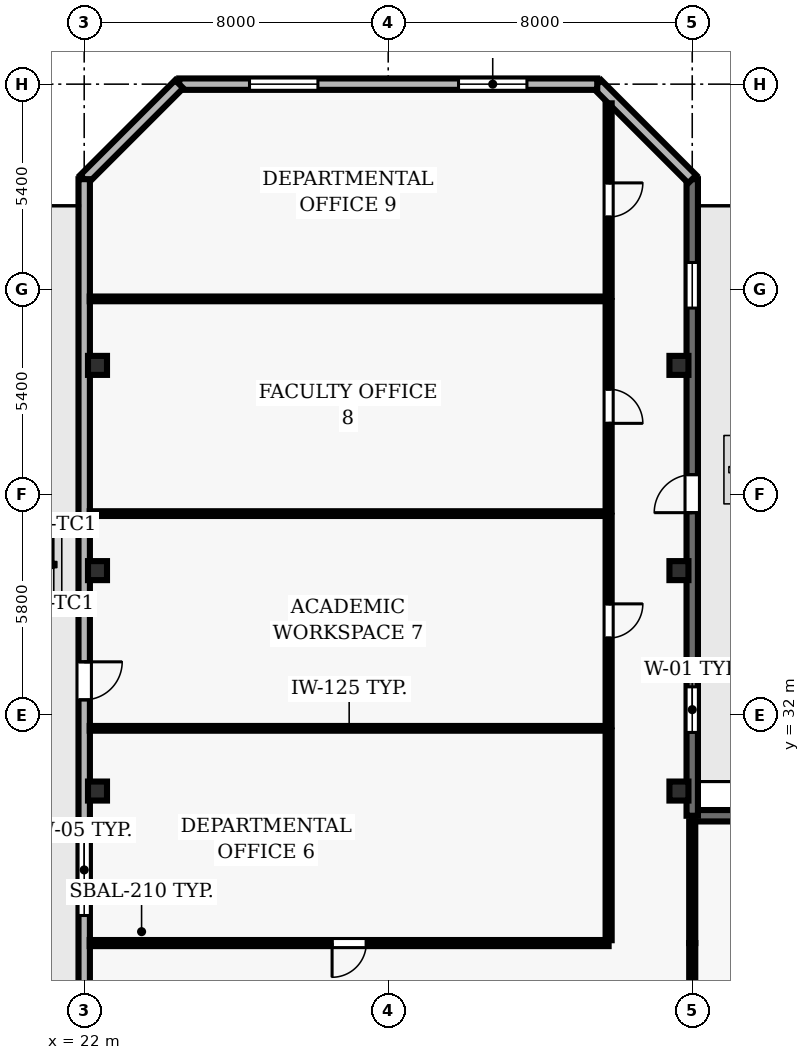
"""IFC4 building model, lengths in metres.
Left out: names, types, materials, properties, quantities, classifications, styles, units other than length and angle.
Written with IfcOpenShell. Run it as: python <this file> out.ifc"""

import sys

from ifc_helpers import new_model, si_unit, direction, frame, frame_2d, origin, origin_2d, place, context, subcontext, project, spatial, rectangle, hollow_rectangle, extrude, element, fill, save


model = new_model("IFC4")
c1 = context("Model", 3, precision=1e-05, world=origin(), true_north=direction((0.0, 1.0)))
c2 = subcontext(c1, "Body", "Model", "MODEL_VIEW")
j1 = project(units=[si_unit("LENGTHUNIT", "METRE"), si_unit("PLANEANGLEUNIT", "RADIAN")], contexts=[c1])
p1 = place(None, origin())
s1 = spatial("IfcSite", under=j1, at=p1, CompositionType="ELEMENT")
p2 = place(p1, origin())
s2 = spatial("IfcBuilding", under=s1, at=p2, CompositionType="ELEMENT")
p3 = place(p2, frame((0.0, 0.0, 119.0)))
s3 = spatial("IfcBuildingStorey", under=s2, at=p3, CompositionType="ELEMENT", Elevation=119.0)
for number, where, z_axis, x_axis in (
    (1, (22.35, 30.0, 0.0), (0.0, 0.0, 1.0), (1.0, 0.0, 0.0)),
    (2, (37.65, 30.0, 0.0), (0.0, 0.0, 1.0), (1.0, 0.0, 0.0)),
    (3, (22.35, 35.8, 0.0), (0.0, 0.0, 1.0), (1.0, 0.0, 0.0)),
    (4, (37.65, 35.8, 0.0), (0.0, 0.0, 1.0), (1.0, 0.0, 0.0)),
    (5, (22.35, 41.2, 0.0), (0.0, 0.0, 1.0), (1.0, 0.0, 0.0)),
    (6, (37.65, 41.2, 0.0), (0.0, 0.0, 1.0), (1.0, 0.0, 0.0)),
):
    element("IfcColumn", number, at=place(p3, frame(where, z_axis=z_axis, x_axis=x_axis)), inside=s3, PredefinedType="COLUMN", context=c2, shape_type="SweptSolid", body=[
        extrude(hollow_rectangle(XDim=0.5, YDim=0.5, WallThickness=0.025, at=origin_2d()), origin(), (0.0, 0.0, 1.0), 3.9),
    ])
p4 = place(p3, frame((46.804, 29.35, 0.0), z_axis=(0.0, 0.0, 1.0), x_axis=(-1.0, 0.0, 0.0)))
e7 = element("IfcWall", 7, at=p4, inside=s3, PredefinedType="SOLIDWALL", context=c2, shape_type="SweptSolid", body=[
    extrude(rectangle(XDim=8.804, YDim=0.3, at=frame_2d((4.402, 0.0))), origin(), (0.0, 0.0, 1.0), 3.69),
])
p5 = place(p4, frame((2.902, 0.0, 0.9)))
e8 = element("IfcOpeningElement", 8, at=p5, cuts=e7, PredefinedType="OPENING", context=c2, shape_type="SweptSolid", body=[
    extrude(rectangle(XDim=3.0, YDim=2.2, at=frame_2d((1.5, 1.1))), frame((0.0, 0.16, 0.0), z_axis=(0.0, -1.0, 0.0), x_axis=(1.0, 0.0, 0.0)), (0.0, 0.0, 1.0), 0.32),
])
p6 = place(p3, frame((38.0, 29.35, 0.0), z_axis=(0.0, 0.0, 1.0), x_axis=(0.0, 1.0, 0.0)))
e9 = element("IfcWall", 9, at=p6, inside=s3, PredefinedType="SOLIDWALL", context=c2, shape_type="SweptSolid", body=[
    extrude(rectangle(XDim=16.75, YDim=0.3, at=frame_2d((8.375, 0.0))), origin(), (0.0, 0.0, 1.0), 3.69),
])
p7 = place(p6, frame((7.975, 0.0, 0.0)))
e10 = element("IfcOpeningElement", 10, at=p7, cuts=e9, PredefinedType="OPENING", context=c2, shape_type="SweptSolid", body=[
    extrude(rectangle(XDim=1.0, YDim=2.2, at=frame_2d((0.5, 1.1))), frame((0.0, 0.16, 0.0), z_axis=(0.0, -1.0, 0.0), x_axis=(1.0, 0.0, 0.0)), (0.0, 0.0, 1.0), 0.32),
])
p8 = place(p6, frame((2.192, 0.0, 0.9)))
e11 = element("IfcOpeningElement", 11, at=p8, cuts=e9, PredefinedType="OPENING", context=c2, shape_type="SweptSolid", body=[
    extrude(rectangle(XDim=1.2, YDim=1.6, at=frame_2d((0.6, 0.8))), frame((0.0, 0.16, 0.0), z_axis=(0.0, -1.0, 0.0), x_axis=(1.0, 0.0, 0.0)), (0.0, 0.0, 1.0), 0.32),
])
p9 = place(p6, frame((13.358, 0.0, 0.9)))
e12 = element("IfcOpeningElement", 12, at=p9, cuts=e9, PredefinedType="OPENING", context=c2, shape_type="SweptSolid", body=[
    extrude(rectangle(XDim=1.2, YDim=1.6, at=frame_2d((0.6, 0.8))), frame((0.0, 0.16, 0.0), z_axis=(0.0, -1.0, 0.0), x_axis=(1.0, 0.0, 0.0)), (0.0, 0.0, 1.0), 0.32),
])
p10 = place(p3, frame((38.0, 46.1, 0.0), z_axis=(0.0, 0.0, 1.0), x_axis=(-0.707106781187, 0.707106781187, 0.0)))
e13 = element("IfcWall", 13, at=p10, inside=s3, PredefinedType="SOLIDWALL", context=c2, shape_type="SweptSolid", body=[
    extrude(rectangle(XDim=3.536, YDim=0.3, at=frame_2d((1.768, 0.0))), origin(), (0.0, 0.0, 1.0), 3.69),
])
p11 = place(p3, frame((35.5, 48.6, 0.0), z_axis=(0.0, 0.0, 1.0), x_axis=(-1.0, 0.0, 0.0)))
e14 = element("IfcWall", 14, at=p11, inside=s3, PredefinedType="SOLIDWALL", context=c2, shape_type="SweptSolid", body=[
    extrude(rectangle(XDim=11.0, YDim=0.3, at=frame_2d((5.5, 0.0))), origin(), (0.0, 0.0, 1.0), 3.69),
])
p12 = place(p11, frame((1.85, 0.0, 0.9)))
e15 = element("IfcOpeningElement", 15, at=p12, cuts=e14, PredefinedType="OPENING", context=c2, shape_type="SweptSolid", body=[
    extrude(rectangle(XDim=1.8, YDim=1.6, at=frame_2d((0.9, 0.8))), frame((0.0, 0.16, 0.0), z_axis=(0.0, -1.0, 0.0), x_axis=(1.0, 0.0, 0.0)), (0.0, 0.0, 1.0), 0.32),
])
p13 = place(p11, frame((7.35, 0.0, 0.9)))
e16 = element("IfcOpeningElement", 16, at=p13, cuts=e14, PredefinedType="OPENING", context=c2, shape_type="SweptSolid", body=[
    extrude(rectangle(XDim=1.8, YDim=1.6, at=frame_2d((0.9, 0.8))), frame((0.0, 0.16, 0.0), z_axis=(0.0, -1.0, 0.0), x_axis=(1.0, 0.0, 0.0)), (0.0, 0.0, 1.0), 0.32),
])
p14 = place(p3, frame((24.5, 48.6, 0.0), z_axis=(0.0, 0.0, 1.0), x_axis=(-0.707106781187, -0.707106781187, 0.0)))
e17 = element("IfcWall", 17, at=p14, inside=s3, PredefinedType="SOLIDWALL", context=c2, shape_type="SweptSolid", body=[
    extrude(rectangle(XDim=3.536, YDim=0.3, at=frame_2d((1.768, 0.0))), origin(), (0.0, 0.0, 1.0), 3.69),
])
p15 = place(p3, frame((22.0, 46.1, 0.0), z_axis=(0.0, 0.0, 1.0), x_axis=(0.0, -1.0, 0.0)))
e18 = element("IfcWall", 18, at=p15, inside=s3, PredefinedType="SOLIDWALL", context=c2, shape_type="SweptSolid", body=[
    extrude(rectangle(XDim=43.6, YDim=0.3, at=frame_2d((21.8, 0.0))), origin(), (0.0, 0.0, 1.0), 3.69),
])
p16 = place(p15, frame((12.7, 0.0, 0.0)))
e19 = element("IfcOpeningElement", 19, at=p16, cuts=e18, PredefinedType="OPENING", context=c2, shape_type="SweptSolid", body=[
    extrude(rectangle(XDim=1.0, YDim=2.2, at=frame_2d((0.5, 1.1))), frame((0.0, 0.16, 0.0), z_axis=(0.0, -1.0, 0.0), x_axis=(1.0, 0.0, 0.0)), (0.0, 0.0, 1.0), 0.32),
])
p17 = place(p15, frame((16.975, 0.0, 0.9)))
e20 = element("IfcOpeningElement", 20, at=p17, cuts=e18, PredefinedType="OPENING", context=c2, shape_type="SweptSolid", body=[
    extrude(rectangle(XDim=2.4, YDim=1.6, at=frame_2d((1.2, 0.8))), frame((0.0, 0.16, 0.0), z_axis=(0.0, -1.0, 0.0), x_axis=(1.0, 0.0, 0.0)), (0.0, 0.0, 1.0), 0.32),
])
p18 = place(p15, frame((23.775, 0.0, 0.9)))
e21 = element("IfcOpeningElement", 21, at=p18, cuts=e18, PredefinedType="OPENING", context=c2, shape_type="SweptSolid", body=[
    extrude(rectangle(XDim=2.4, YDim=1.6, at=frame_2d((1.2, 0.8))), frame((0.0, 0.16, 0.0), z_axis=(0.0, -1.0, 0.0), x_axis=(1.0, 0.0, 0.0)), (0.0, 0.0, 1.0), 0.32),
])
p19 = place(p15, frame((27.875, 0.0, 0.9)))
e22 = element("IfcOpeningElement", 22, at=p19, cuts=e18, PredefinedType="OPENING", context=c2, shape_type="SweptSolid", body=[
    extrude(rectangle(XDim=2.4, YDim=1.6, at=frame_2d((1.2, 0.8))), frame((0.0, 0.16, 0.0), z_axis=(0.0, -1.0, 0.0), x_axis=(1.0, 0.0, 0.0)), (0.0, 0.0, 1.0), 0.32),
])
p20 = place(p15, frame((34.225, 0.0, 0.9)))
e23 = element("IfcOpeningElement", 23, at=p20, cuts=e18, PredefinedType="OPENING", context=c2, shape_type="SweptSolid", body=[
    extrude(rectangle(XDim=2.4, YDim=1.6, at=frame_2d((1.2, 0.8))), frame((0.0, 0.16, 0.0), z_axis=(0.0, -1.0, 0.0), x_axis=(1.0, 0.0, 0.0)), (0.0, 0.0, 1.0), 0.32),
])
p21 = place(p3, frame((35.8, 26.0, 0.0), z_axis=(0.0, 0.0, 1.0), x_axis=(-1.0, 0.0, 0.0)))
e24 = element("IfcWall", 24, at=p21, inside=s3, PredefinedType="PARTITIONING", context=c2, shape_type="SweptSolid", body=[
    extrude(rectangle(XDim=13.655, YDim=0.16, at=frame_2d((6.828, 0.0))), origin(), (0.0, 0.0, 1.0), 3.69),
])
p22 = place(p21, frame((6.377, 0.0, 0.0)))
e25 = element("IfcOpeningElement", 25, at=p22, cuts=e24, PredefinedType="OPENING", context=c2, shape_type="SweptSolid", body=[
    extrude(rectangle(XDim=0.9, YDim=2.1, at=frame_2d((0.45, 1.05))), frame((0.0, 0.09, 0.0), z_axis=(0.0, -1.0, 0.0), x_axis=(1.0, 0.0, 0.0)), (0.0, 0.0, 1.0), 0.18),
])
for number, where, z_axis, x_axis in (
    (26, (35.8, 31.65, 0.0), (0.0, 0.0, 1.0), (-1.0, 0.0, 0.0)),
    (27, (35.8, 37.3, 0.0), (0.0, 0.0, 1.0), (-1.0, 0.0, 0.0)),
    (28, (35.8, 42.95, 0.0), (0.0, 0.0, 1.0), (-1.0, 0.0, 0.0)),
):
    element("IfcWall", number, at=place(p3, frame(where, z_axis=z_axis, x_axis=x_axis)), inside=s3, PredefinedType="PARTITIONING", context=c2, shape_type="SweptSolid", body=[
        extrude(rectangle(XDim=13.655, YDim=0.125, at=frame_2d((6.828, 0.0))), origin(), (0.0, 0.0, 1.0), 3.69),
    ])
p23 = place(p3, frame((35.8, 31.592, 0.0), z_axis=(0.0, 0.0, 1.0), x_axis=(0.0, -1.0, 0.0)))
e29 = element("IfcWall", 29, at=p23, inside=s3, PredefinedType="PARTITIONING", context=c2, shape_type="SweptSolid", body=[
    extrude(rectangle(XDim=5.517, YDim=0.16, at=frame_2d((2.759, 0.0))), origin(), (0.0, 0.0, 1.0), 3.69),
])
p24 = place(p3, frame((35.8, 37.242, 0.0), z_axis=(0.0, 0.0, 1.0), x_axis=(0.0, -1.0, 0.0)))
e30 = element("IfcWall", 30, at=p24, inside=s3, PredefinedType="PARTITIONING", context=c2, shape_type="SweptSolid", body=[
    extrude(rectangle(XDim=5.535, YDim=0.16, at=frame_2d((2.768, 0.0))), origin(), (0.0, 0.0, 1.0), 3.69),
])
p25 = place(p24, frame((2.317, 0.0, 0.0)))
e31 = element("IfcOpeningElement", 31, at=p25, cuts=e30, PredefinedType="OPENING", context=c2, shape_type="SweptSolid", body=[
    extrude(rectangle(XDim=0.9, YDim=2.1, at=frame_2d((0.45, 1.05))), frame((0.0, 0.09, 0.0), z_axis=(0.0, -1.0, 0.0), x_axis=(1.0, 0.0, 0.0)), (0.0, 0.0, 1.0), 0.18),
])
p26 = place(p3, frame((35.8, 42.893, 0.0), z_axis=(0.0, 0.0, 1.0), x_axis=(0.0, -1.0, 0.0)))
e32 = element("IfcWall", 32, at=p26, inside=s3, PredefinedType="PARTITIONING", context=c2, shape_type="SweptSolid", body=[
    extrude(rectangle(XDim=5.536, YDim=0.16, at=frame_2d((2.768, 0.0))), origin(), (0.0, 0.0, 1.0), 3.69),
])
p27 = place(p26, frame((2.318, 0.0, 0.0)))
e33 = element("IfcOpeningElement", 33, at=p27, cuts=e32, PredefinedType="OPENING", context=c2, shape_type="SweptSolid", body=[
    extrude(rectangle(XDim=0.9, YDim=2.1, at=frame_2d((0.45, 1.05))), frame((0.0, 0.09, 0.0), z_axis=(0.0, -1.0, 0.0), x_axis=(1.0, 0.0, 0.0)), (0.0, 0.0, 1.0), 0.18),
])
p28 = place(p3, frame((35.8, 48.095, 0.0), z_axis=(0.0, 0.0, 1.0), x_axis=(0.0, -1.0, 0.0)))
e34 = element("IfcWall", 34, at=p28, inside=s3, PredefinedType="PARTITIONING", context=c2, shape_type="SweptSolid", body=[
    extrude(rectangle(XDim=5.087, YDim=0.16, at=frame_2d((2.543, 0.0))), origin(), (0.0, 0.0, 1.0), 3.69),
])
p29 = place(p28, frame((2.093, 0.0, 0.0)))
e35 = element("IfcOpeningElement", 35, at=p29, cuts=e34, PredefinedType="OPENING", context=c2, shape_type="SweptSolid", body=[
    extrude(rectangle(XDim=0.9, YDim=2.1, at=frame_2d((0.45, 1.05))), frame((0.0, 0.09, 0.0), z_axis=(0.0, -1.0, 0.0), x_axis=(1.0, 0.0, 0.0)), (0.0, 0.0, 1.0), 0.18),
])
p30 = place(p3, frame((38.0, 23.85, 0.0), z_axis=(0.0, 0.0, 1.0), x_axis=(0.0, 1.0, 0.0)))
e36 = element("IfcWall", 36, at=p30, inside=s3, PredefinedType="PARTITIONING", context=c2, shape_type="SweptSolid", body=[
    extrude(rectangle(XDim=2.15, YDim=0.16, at=frame_2d((1.075, 0.0))), origin(), (0.0, 0.0, 1.0), 3.074),
])
p31 = place(p3, frame((38.0, 26.0, 0.0), z_axis=(0.0, 0.0, 1.0), x_axis=(0.0, 1.0, 0.0)))
e37 = element("IfcWall", 37, at=p31, inside=s3, PredefinedType="PARTITIONING", context=c2, shape_type="SweptSolid", body=[
    extrude(rectangle(XDim=3.205, YDim=0.16, at=frame_2d((1.603, 0.0))), origin(), (0.0, 0.0, 1.0), 3.074),
])
p32 = place(p7, origin())
e38 = element("IfcDoor", 38, at=p32, inside=s3, OperationType="SINGLE_SWING_LEFT", PredefinedType="DOOR", context=c2, shape_type="SweptSolid", body=[
    extrude(rectangle(XDim=1.0, YDim=2.2, at=frame_2d((0.5, 1.1))), frame((0.0, 0.025, 0.0), z_axis=(0.0, -1.0, 0.0), x_axis=(1.0, 0.0, 0.0)), (0.0, 0.0, 1.0), 0.05),
])
fill(e10, e38)
p33 = place(p8, origin())
e39 = element("IfcWindow", 39, at=p33, inside=s3, PartitioningType="SINGLE_PANEL", PredefinedType="WINDOW", context=c2, shape_type="SweptSolid", body=[
    extrude(rectangle(XDim=1.2, YDim=1.6, at=frame_2d((0.6, 0.8))), frame((0.0, 0.03, 0.0), z_axis=(0.0, -1.0, 0.0), x_axis=(1.0, 0.0, 0.0)), (0.0, 0.0, 1.0), 0.06),
])
fill(e11, e39)
p34 = place(p9, origin())
e40 = element("IfcWindow", 40, at=p34, inside=s3, PartitioningType="SINGLE_PANEL", PredefinedType="WINDOW", context=c2, shape_type="SweptSolid", body=[
    extrude(rectangle(XDim=1.2, YDim=1.6, at=frame_2d((0.6, 0.8))), frame((0.0, 0.03, 0.0), z_axis=(0.0, -1.0, 0.0), x_axis=(1.0, 0.0, 0.0)), (0.0, 0.0, 1.0), 0.06),
])
fill(e12, e40)
p35 = place(p12, origin())
e41 = element("IfcWindow", 41, at=p35, inside=s3, PartitioningType="SINGLE_PANEL", PredefinedType="WINDOW", context=c2, shape_type="SweptSolid", body=[
    extrude(rectangle(XDim=1.8, YDim=1.6, at=frame_2d((0.9, 0.8))), frame((0.0, 0.03, 0.0), z_axis=(0.0, -1.0, 0.0), x_axis=(1.0, 0.0, 0.0)), (0.0, 0.0, 1.0), 0.06),
])
fill(e15, e41)
p36 = place(p13, origin())
e42 = element("IfcWindow", 42, at=p36, inside=s3, PartitioningType="SINGLE_PANEL", PredefinedType="WINDOW", context=c2, shape_type="SweptSolid", body=[
    extrude(rectangle(XDim=1.8, YDim=1.6, at=frame_2d((0.9, 0.8))), frame((0.0, 0.03, 0.0), z_axis=(0.0, -1.0, 0.0), x_axis=(1.0, 0.0, 0.0)), (0.0, 0.0, 1.0), 0.06),
])
fill(e16, e42)
p37 = place(p16, origin())
e43 = element("IfcDoor", 43, at=p37, inside=s3, OperationType="SINGLE_SWING_LEFT", PredefinedType="DOOR", context=c2, shape_type="SweptSolid", body=[
    extrude(rectangle(XDim=1.0, YDim=2.2, at=frame_2d((0.5, 1.1))), frame((0.0, 0.025, 0.0), z_axis=(0.0, -1.0, 0.0), x_axis=(1.0, 0.0, 0.0)), (0.0, 0.0, 1.0), 0.05),
])
fill(e19, e43)
p38 = place(p17, origin())
e44 = element("IfcWindow", 44, at=p38, inside=s3, PartitioningType="SINGLE_PANEL", PredefinedType="WINDOW", context=c2, shape_type="SweptSolid", body=[
    extrude(rectangle(XDim=2.4, YDim=1.6, at=frame_2d((1.2, 0.8))), frame((0.0, 0.03, 0.0), z_axis=(0.0, -1.0, 0.0), x_axis=(1.0, 0.0, 0.0)), (0.0, 0.0, 1.0), 0.06),
])
fill(e20, e44)
p39 = place(p22, origin())
e45 = element("IfcDoor", 45, at=p39, inside=s3, OperationType="SINGLE_SWING_RIGHT", PredefinedType="DOOR", context=c2, shape_type="SweptSolid", body=[
    extrude(rectangle(XDim=0.9, YDim=2.1, at=frame_2d((0.45, 1.05))), frame((0.0, 0.025, 0.0), z_axis=(0.0, -1.0, 0.0), x_axis=(1.0, 0.0, 0.0)), (0.0, 0.0, 1.0), 0.05),
])
fill(e25, e45)
p40 = place(p25, origin())
e46 = element("IfcDoor", 46, at=p40, inside=s3, OperationType="SINGLE_SWING_LEFT", PredefinedType="DOOR", context=c2, shape_type="SweptSolid", body=[
    extrude(rectangle(XDim=0.9, YDim=2.1, at=frame_2d((0.45, 1.05))), frame((0.0, 0.025, 0.0), z_axis=(0.0, -1.0, 0.0), x_axis=(1.0, 0.0, 0.0)), (0.0, 0.0, 1.0), 0.05),
])
fill(e31, e46)
p41 = place(p27, origin())
e47 = element("IfcDoor", 47, at=p41, inside=s3, OperationType="SINGLE_SWING_RIGHT", PredefinedType="DOOR", context=c2, shape_type="SweptSolid", body=[
    extrude(rectangle(XDim=0.9, YDim=2.1, at=frame_2d((0.45, 1.05))), frame((0.0, 0.025, 0.0), z_axis=(0.0, -1.0, 0.0), x_axis=(1.0, 0.0, 0.0)), (0.0, 0.0, 1.0), 0.05),
])
fill(e33, e47)
p42 = place(p29, origin())
e48 = element("IfcDoor", 48, at=p42, inside=s3, OperationType="SINGLE_SWING_LEFT", PredefinedType="DOOR", context=c2, shape_type="SweptSolid", body=[
    extrude(rectangle(XDim=0.9, YDim=2.1, at=frame_2d((0.45, 1.05))), frame((0.0, 0.025, 0.0), z_axis=(0.0, -1.0, 0.0), x_axis=(1.0, 0.0, 0.0)), (0.0, 0.0, 1.0), 0.05),
])
fill(e35, e48)
save(model, sys.argv[1])
